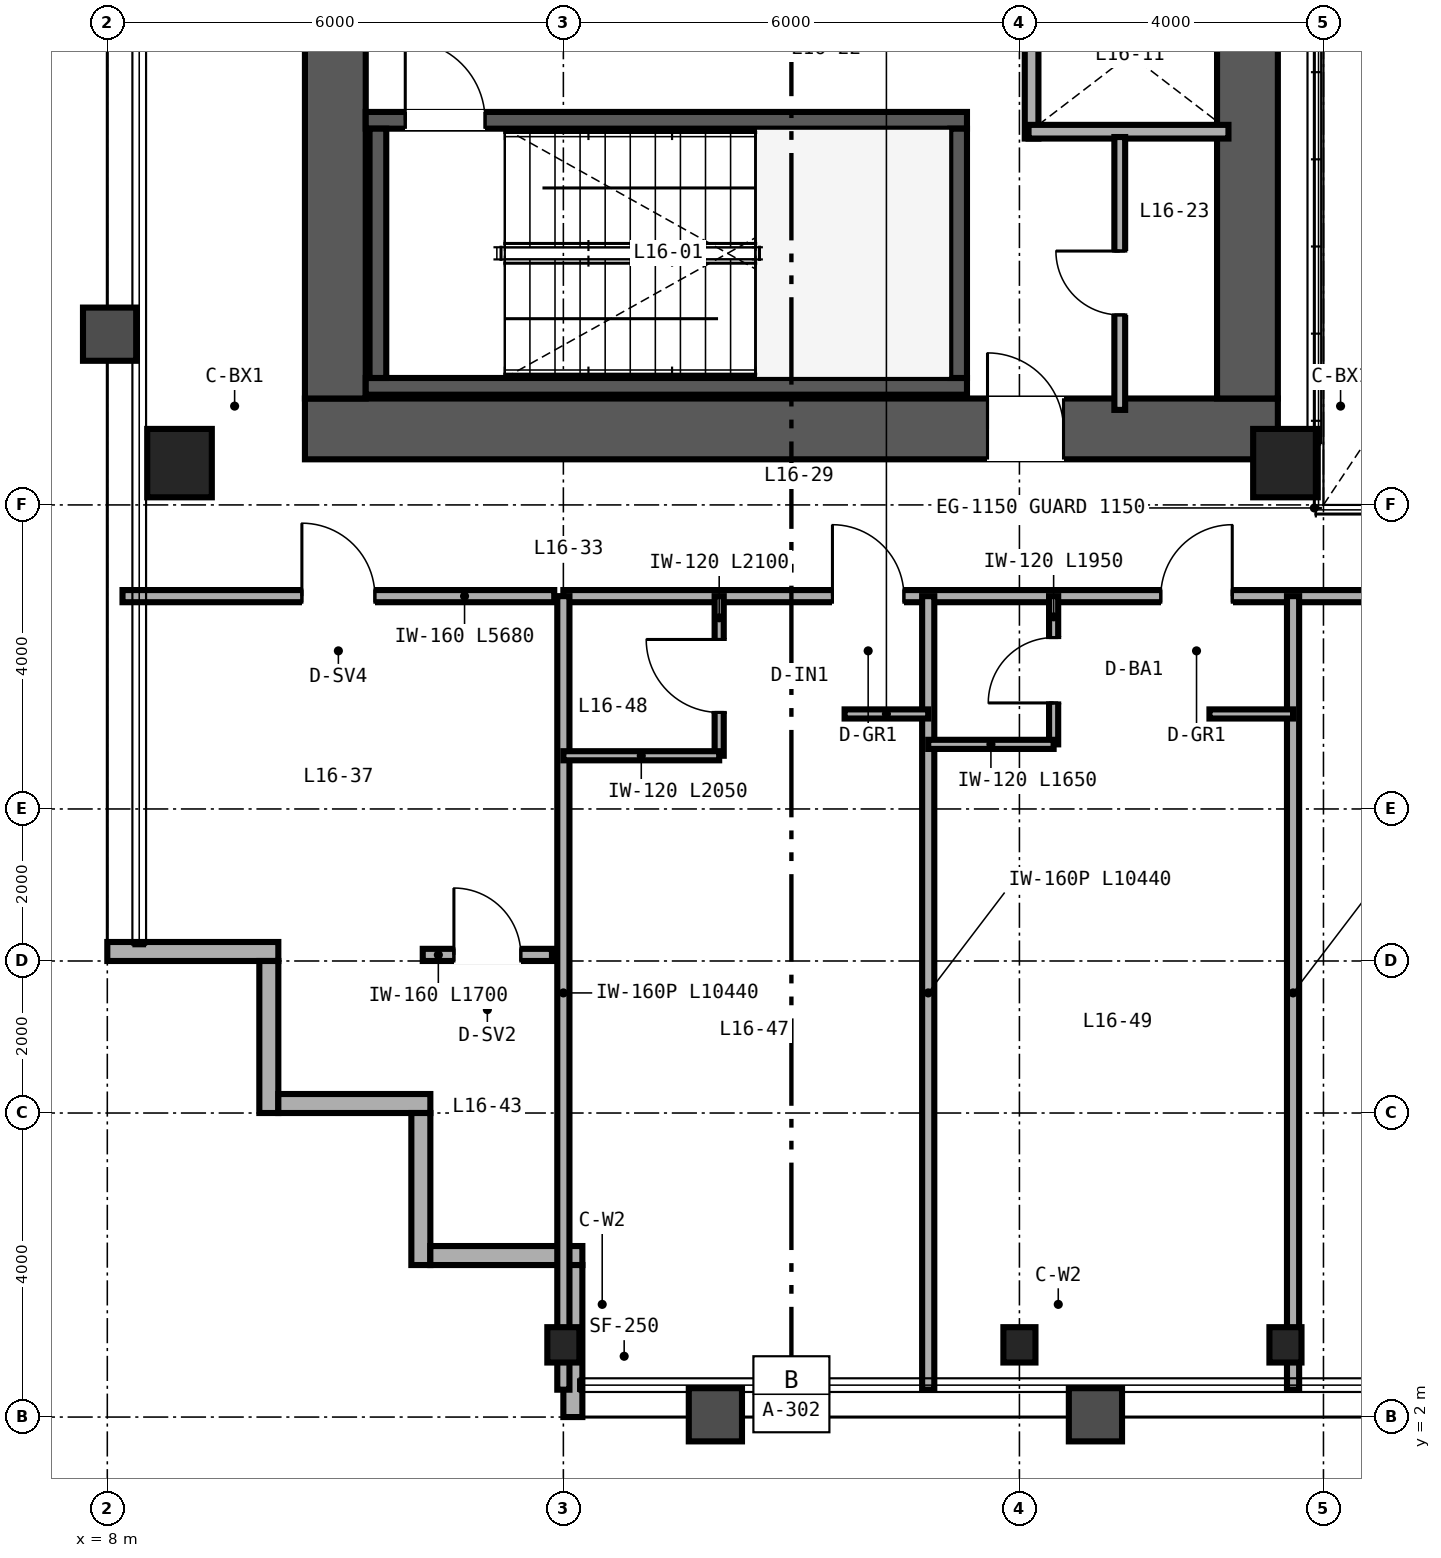
"""IFC4 building model, lengths in metres.
Left out: names, types, materials, properties, quantities, classifications, styles, units other than length and angle.
Written with IfcOpenShell. Run it as: python <this file> out.ifc"""

import sys

from ifc_helpers import new_model, si_unit, direction, frame, frame_2d, origin, origin_2d, place, context, subcontext, project, spatial, rectangle, hollow_rectangle, i_section, extrude, source, transform, mapped, element, fill, save


model = new_model("IFC4")
c1 = context("Model", 3, precision=1e-05, world=origin(), true_north=direction((0.0, 1.0)))
c2 = subcontext(c1, "Body", "Model", "MODEL_VIEW")
j1 = project(units=[si_unit("LENGTHUNIT", "METRE"), si_unit("PLANEANGLEUNIT", "RADIAN")], contexts=[c1])
p1 = place(None, origin())
s1 = spatial("IfcSite", under=j1, at=p1, CompositionType="ELEMENT")
p2 = place(p1, origin())
s2 = spatial("IfcBuilding", under=s1, at=p2, CompositionType="ELEMENT")
p3 = place(p2, frame((0.0, 0.0, 67.2)))
s3 = spatial("IfcBuildingStorey", under=s2, at=p3, CompositionType="ELEMENT", Elevation=67.2)
p4 = place(p3, frame((10.6, 15.0, 0.0), z_axis=(0.0, 0.0, 1.0), x_axis=(1.0, 0.0, 0.0)))
e1 = element("IfcWall", 1, at=p4, inside=s3, PredefinedType="SHEAR", context=c2, shape_type="SweptSolid", body=[
    extrude(rectangle(XDim=12.8, YDim=0.8, at=frame_2d((6.4, 0.0))), origin(), (0.0, 0.0, 1.0), 3.35),
])
p5 = place(p4, frame((8.98, 0.0, 0.0)))
e2 = element("IfcOpeningElement", 2, at=p5, cuts=e1, PredefinedType="OPENING", context=c2, shape_type="SweptSolid", body=[
    extrude(rectangle(XDim=1.0, YDim=2.15, at=frame_2d((0.5, 1.075))), frame((0.0, 0.41, 0.0), z_axis=(0.0, -1.0, 0.0), x_axis=(1.0, 0.0, 0.0)), (0.0, 0.0, 1.0), 0.82),
])
for number, where, z_axis, x_axis in (
    (3, (11.0, 15.4, 0.0), (0.0, 0.0, 1.0), (0.0, 1.0, 0.0)),
    (4, (23.0, 15.4, 0.0), (0.0, 0.0, 1.0), (0.0, 1.0, 0.0)),
):
    element("IfcWall", number, at=place(p3, frame(where, z_axis=z_axis, x_axis=x_axis)), inside=s3, PredefinedType="SHEAR", context=c2, shape_type="SweptSolid", body=[
        extrude(rectangle(XDim=21.2, YDim=0.8, at=frame_2d((10.6, 0.0))), origin(), (0.0, 0.0, 1.0), 3.35),
    ])
p6 = place(p3, frame((11.4, 15.56, 0.0), z_axis=(0.0, 0.0, 1.0), x_axis=(1.0, 0.0, 0.0)))
e5 = element("IfcWall", 5, at=p6, inside=s3, PredefinedType="SHEAR", context=c2, shape_type="SweptSolid", body=[
    extrude(rectangle(XDim=7.91, YDim=0.22, at=frame_2d((3.955, 0.0))), origin(), (0.0, 0.0, 1.0), 3.4),
])
p7 = place(p3, frame((11.4, 19.06, 0.0), z_axis=(0.0, 0.0, 1.0), x_axis=(1.0, 0.0, 0.0)))
e6 = element("IfcWall", 6, at=p7, inside=s3, PredefinedType="SHEAR", context=c2, shape_type="SweptSolid", body=[
    extrude(rectangle(XDim=7.91, YDim=0.22, at=frame_2d((3.955, 0.0))), origin(), (0.0, 0.0, 1.0), 3.4),
])
p8 = place(p7, frame((0.52, 0.0, 0.0)))
e7 = element("IfcOpeningElement", 7, at=p8, cuts=e6, PredefinedType="OPENING", context=c2, shape_type="SweptSolid", body=[
    extrude(rectangle(XDim=1.05, YDim=2.15, at=frame_2d((0.525, 1.075))), frame((0.0, 0.12, 0.0), z_axis=(0.0, -1.0, 0.0), x_axis=(1.0, 0.0, 0.0)), (0.0, 0.0, 1.0), 0.24),
])
for number, where, z_axis, x_axis in (
    (8, (11.56, 15.67, 0.0), (0.0, 0.0, 1.0), (0.0, 1.0, 0.0)),
    (9, (19.2, 15.67, 0.0), (0.0, 0.0, 1.0), (0.0, 1.0, 0.0)),
):
    element("IfcWall", number, at=place(p3, frame(where, z_axis=z_axis, x_axis=x_axis)), inside=s3, PredefinedType="SHEAR", context=c2, shape_type="SweptSolid", body=[
        extrude(rectangle(XDim=3.28, YDim=0.22, at=frame_2d((1.64, 0.0))), origin(), (0.0, 0.0, 1.0), 3.4),
    ])
m1 = source(origin(), c2, "Body", "SweptSolid", [
    extrude(hollow_rectangle(XDim=0.85, YDim=0.9, WallThickness=0.04, at=origin_2d()), origin(), (0.0, 0.0, 1.0), 3.35),
])
for number, where, z_axis, x_axis in (
    (10, (8.95, 14.55, 0.0), (0.0, 0.0, 1.0), (1.0, 0.0, 0.0)),
    (11, (23.5, 14.55, 0.0), (0.0, 0.0, 1.0), (1.0, 0.0, 0.0)),
):
    element("IfcColumn", number, at=place(p3, frame(where, z_axis=z_axis, x_axis=x_axis)), inside=s3, PredefinedType="COLUMN", context=c2, shape_type="MappedRepresentation", body=[
        mapped(m1, transform((0.0, 0.0, 0.0), scale=1.0)),
    ])
m2 = source(origin(), c2, "Body", "SweptSolid", [
    extrude(i_section(OverallWidth=0.422, OverallDepth=0.465, WebThickness=0.045, FlangeThickness=0.073, FilletRadius=0.025, at=origin_2d()), origin(), (0.0, 0.0, 1.0), 3.35),
])
for number, where, z_axis, x_axis in (
    (12, (14.0, 2.95, 0.0), (0.0, 0.0, 1.0), (1.0, 0.0, 0.0)),
    (13, (20.0, 2.95, 0.0), (0.0, 0.0, 1.0), (1.0, 0.0, 0.0)),
    (14, (23.5, 2.95, 0.0), (0.0, 0.0, 1.0), (1.0, 0.0, 0.0)),
):
    element("IfcColumn", number, at=place(p3, frame(where, z_axis=z_axis, x_axis=x_axis)), inside=s3, PredefinedType="COLUMN", context=c2, shape_type="MappedRepresentation", body=[
        mapped(m2, transform((0.0, 0.0, 0.0), scale=1.0)),
    ])
p9 = place(p3, frame((8.0, 8.125, 0.0), z_axis=(0.0, 0.0, 1.0), x_axis=(1.0, 0.0, 0.0)))
e15 = element("IfcWall", 15, at=p9, inside=s3, PredefinedType="SOLIDWALL", context=c2, shape_type="SweptSolid", body=[
    extrude(rectangle(XDim=2.25, YDim=0.25, at=frame_2d((1.125, 0.0))), origin(), (0.0, 0.0, 1.0), 3.35),
])
for number, where, z_axis, x_axis in (
    (16, (10.125, 8.0, 0.0), (0.0, 0.0, 1.0), (0.0, -1.0, 0.0)),
    (17, (10.25, 6.125, 0.0), (0.0, 0.0, 1.0), (1.0, 0.0, 0.0)),
    (18, (12.125, 6.0, 0.0), (0.0, 0.0, 1.0), (0.0, -1.0, 0.0)),
    (19, (12.25, 4.125, 0.0), (0.0, 0.0, 1.0), (1.0, 0.0, 0.0)),
):
    element("IfcWall", number, at=place(p3, frame(where, z_axis=z_axis, x_axis=x_axis)), inside=s3, PredefinedType="SOLIDWALL", context=c2, shape_type="SweptSolid", body=[
        extrude(rectangle(XDim=2.0, YDim=0.25, at=frame_2d((1.0, 0.0))), origin(), (0.0, 0.0, 1.0), 3.35),
    ])
p10 = place(p3, frame((14.125, 4.0, 0.0), z_axis=(0.0, 0.0, 1.0), x_axis=(0.0, -1.0, 0.0)))
e20 = element("IfcWall", 20, at=p10, inside=s3, PredefinedType="SOLIDWALL", context=c2, shape_type="SweptSolid", body=[
    extrude(rectangle(XDim=2.0, YDim=0.25, at=frame_2d((1.0, 0.0))), origin(), (0.0, 0.0, 1.0), 2.657),
])
p11 = place(p3, frame((20.16, 18.82, 0.0), z_axis=(0.0, 0.0, 1.0), x_axis=(0.0, 1.0, 0.0)))
e21 = element("IfcWall", 21, at=p11, inside=s3, PredefinedType="SOLIDWALL", context=c2, shape_type="SweptSolid", body=[
    extrude(rectangle(XDim=6.32, YDim=0.18, at=frame_2d((3.16, 0.0))), origin(), (0.0, 0.0, 1.0), 2.36),
])
p12 = place(p3, frame((20.12, 18.91, 0.0), z_axis=(0.0, 0.0, 1.0), x_axis=(1.0, 0.0, 0.0)))
e22 = element("IfcWall", 22, at=p12, inside=s3, PredefinedType="SOLIDWALL", context=c2, shape_type="SweptSolid", body=[
    extrude(rectangle(XDim=2.63, YDim=0.18, at=frame_2d((1.315, 0.0))), origin(), (0.0, 0.0, 1.0), 3.35),
])
p13 = place(p3, frame((21.32, 15.25, 0.0), z_axis=(0.0, 0.0, 1.0), x_axis=(0.0, 1.0, 0.0)))
e23 = element("IfcWall", 23, at=p13, inside=s3, PredefinedType="PARTITIONING", context=c2, shape_type="SweptSolid", body=[
    extrude(rectangle(XDim=3.59, YDim=0.142, at=frame_2d((1.795, 0.0))), origin(), (0.0, 0.0, 1.0), 3.35),
])
p14 = place(p13, frame((1.25, 0.0, 0.0)))
e24 = element("IfcOpeningElement", 24, at=p14, cuts=e23, PredefinedType="OPENING", context=c2, shape_type="SweptSolid", body=[
    extrude(rectangle(XDim=0.84, YDim=2.1, at=frame_2d((0.42, 1.05))), frame((0.0, 0.081, 0.0), z_axis=(0.0, -1.0, 0.0), x_axis=(1.0, 0.0, 0.0)), (0.0, 0.0, 1.0), 0.162),
])
p15 = place(p3, frame((8.2, 12.8, 0.0), z_axis=(0.0, 0.0, 1.0), x_axis=(1.0, 0.0, 0.0)))
e25 = element("IfcWall", 25, at=p15, inside=s3, PredefinedType="PARTITIONING", context=c2, shape_type="SweptSolid", body=[
    extrude(rectangle(XDim=5.68, YDim=0.16, at=frame_2d((2.84, 0.0))), origin(), (0.0, 0.0, 1.0), 3.35),
])
p16 = place(p15, frame((2.36, 0.0, 0.0)))
e26 = element("IfcOpeningElement", 26, at=p16, cuts=e25, PredefinedType="OPENING", context=c2, shape_type="SweptSolid", body=[
    extrude(rectangle(XDim=0.96, YDim=2.15, at=frame_2d((0.48, 1.075))), frame((0.0, 0.09, 0.0), z_axis=(0.0, -1.0, 0.0), x_axis=(1.0, 0.0, 0.0)), (0.0, 0.0, 1.0), 0.18),
])
p17 = place(p3, frame((12.15, 8.08, 0.0), z_axis=(0.0, 0.0, 1.0), x_axis=(1.0, 0.0, 0.0)))
e27 = element("IfcWall", 27, at=p17, inside=s3, PredefinedType="PARTITIONING", context=c2, shape_type="SweptSolid", body=[
    extrude(rectangle(XDim=1.7, YDim=0.16, at=frame_2d((0.85, 0.0))), origin(), (0.0, 0.0, 1.0), 3.35),
])
p18 = place(p17, frame((0.41, 0.0, 0.0)))
e28 = element("IfcOpeningElement", 28, at=p18, cuts=e27, PredefinedType="OPENING", context=c2, shape_type="SweptSolid", body=[
    extrude(rectangle(XDim=0.88, YDim=2.15, at=frame_2d((0.44, 1.075))), frame((0.0, 0.09, 0.0), z_axis=(0.0, -1.0, 0.0), x_axis=(1.0, 0.0, 0.0)), (0.0, 0.0, 1.0), 0.18),
])
p19 = place(p3, frame((14.0, 12.8, 0.0), z_axis=(0.0, 0.0, 1.0), x_axis=(1.0, 0.0, 0.0)))
e29 = element("IfcWall", 29, at=p19, inside=s3, PredefinedType="PARTITIONING", context=c2, shape_type="SweptSolid", body=[
    extrude(rectangle(XDim=36.0, YDim=0.16, at=frame_2d((18.0, 0.0))), origin(), (0.0, 0.0, 1.0), 2.571),
])
p20 = place(p19, frame((3.54, 0.0, 0.0)))
e30 = element("IfcOpeningElement", 30, at=p20, cuts=e29, PredefinedType="OPENING", context=c2, shape_type="SweptSolid", body=[
    extrude(rectangle(XDim=0.94, YDim=2.15, at=frame_2d((0.47, 1.075))), frame((0.0, 0.09, 0.0), z_axis=(0.0, -1.0, 0.0), x_axis=(1.0, 0.0, 0.0)), (0.0, 0.0, 1.0), 0.18),
])
p21 = place(p19, frame((7.86, 0.0, 0.0)))
e31 = element("IfcOpeningElement", 31, at=p21, cuts=e29, PredefinedType="OPENING", context=c2, shape_type="SweptSolid", body=[
    extrude(rectangle(XDim=0.94, YDim=2.15, at=frame_2d((0.47, 1.075))), frame((0.0, 0.09, 0.0), z_axis=(0.0, -1.0, 0.0), x_axis=(1.0, 0.0, 0.0)), (0.0, 0.0, 1.0), 0.18),
])
p22 = place(p19, frame((11.92, 0.0, 0.0)))
e32 = element("IfcOpeningElement", 32, at=p22, cuts=e29, PredefinedType="OPENING", context=c2, shape_type="SweptSolid", body=[
    extrude(rectangle(XDim=0.96, YDim=2.15, at=frame_2d((0.48, 1.075))), frame((0.0, 0.09, 0.0), z_axis=(0.0, -1.0, 0.0), x_axis=(1.0, 0.0, 0.0)), (0.0, 0.0, 1.0), 0.18),
])
p23 = place(p19, frame((17.52, 0.0, 0.0)))
e33 = element("IfcOpeningElement", 33, at=p23, cuts=e29, PredefinedType="OPENING", context=c2, shape_type="SweptSolid", body=[
    extrude(rectangle(XDim=0.96, YDim=2.15, at=frame_2d((0.48, 1.075))), frame((0.0, 0.09, 0.0), z_axis=(0.0, -1.0, 0.0), x_axis=(1.0, 0.0, 0.0)), (0.0, 0.0, 1.0), 0.18),
])
p24 = place(p19, frame((24.74, 0.0, 0.0)))
e34 = element("IfcOpeningElement", 34, at=p24, cuts=e29, PredefinedType="OPENING", context=c2, shape_type="SweptSolid", body=[
    extrude(rectangle(XDim=0.94, YDim=2.15, at=frame_2d((0.47, 1.075))), frame((0.0, 0.09, 0.0), z_axis=(0.0, -1.0, 0.0), x_axis=(1.0, 0.0, 0.0)), (0.0, 0.0, 1.0), 0.18),
])
p25 = place(p19, frame((29.74, 0.0, 0.0)))
e35 = element("IfcOpeningElement", 35, at=p25, cuts=e29, PredefinedType="OPENING", context=c2, shape_type="SweptSolid", body=[
    extrude(rectangle(XDim=0.94, YDim=2.15, at=frame_2d((0.47, 1.075))), frame((0.0, 0.09, 0.0), z_axis=(0.0, -1.0, 0.0), x_axis=(1.0, 0.0, 0.0)), (0.0, 0.0, 1.0), 0.18),
])
p26 = place(p19, frame((33.02, 0.0, 0.0)))
e36 = element("IfcOpeningElement", 36, at=p26, cuts=e29, PredefinedType="OPENING", context=c2, shape_type="SweptSolid", body=[
    extrude(rectangle(XDim=0.96, YDim=2.15, at=frame_2d((0.48, 1.075))), frame((0.0, 0.09, 0.0), z_axis=(0.0, -1.0, 0.0), x_axis=(1.0, 0.0, 0.0)), (0.0, 0.0, 1.0), 0.18),
])
for number, where, z_axis, x_axis in (
    (37, (14.0, 2.36, 0.0), (0.0, 0.0, 1.0), (0.0, 1.0, 0.0)),
    (38, (18.8, 2.36, 0.0), (0.0, 0.0, 1.0), (0.0, 1.0, 0.0)),
):
    element("IfcWall", number, at=place(p3, frame(where, z_axis=z_axis, x_axis=x_axis)), inside=s3, PredefinedType="PARTITIONING", context=c2, shape_type="SweptSolid", body=[
        extrude(rectangle(XDim=10.44, YDim=0.16, at=frame_2d((5.22, 0.0))), origin(), (0.0, 0.0, 1.0), 2.657),
    ])
p27 = place(p3, frame((16.05, 10.7, 0.0), z_axis=(0.0, 0.0, 1.0), x_axis=(0.0, 1.0, 0.0)))
e39 = element("IfcWall", 39, at=p27, inside=s3, PredefinedType="PARTITIONING", context=c2, shape_type="SweptSolid", body=[
    extrude(rectangle(XDim=2.1, YDim=0.12, at=frame_2d((1.05, 0.0))), origin(), (0.0, 0.0, 1.0), 3.35),
])
p28 = place(p27, frame((0.57, 0.0, 0.0)))
e40 = element("IfcOpeningElement", 40, at=p28, cuts=e39, PredefinedType="OPENING", context=c2, shape_type="SweptSolid", body=[
    extrude(rectangle(XDim=0.96, YDim=2.15, at=frame_2d((0.48, 1.075))), frame((0.0, 0.07, 0.0), z_axis=(0.0, -1.0, 0.0), x_axis=(1.0, 0.0, 0.0)), (0.0, 0.0, 1.0), 0.14),
])
p29 = place(p3, frame((14.0, 10.7, 0.0), z_axis=(0.0, 0.0, 1.0), x_axis=(1.0, 0.0, 0.0)))
e41 = element("IfcWall", 41, at=p29, inside=s3, PredefinedType="PARTITIONING", context=c2, shape_type="SweptSolid", body=[
    extrude(rectangle(XDim=2.05, YDim=0.12, at=frame_2d((1.025, 0.0))), origin(), (0.0, 0.0, 1.0), 3.35),
])
p30 = place(p3, frame((17.7, 11.25, 0.0), z_axis=(0.0, 0.0, 1.0), x_axis=(1.0, 0.0, 0.0)))
e42 = element("IfcWall", 42, at=p30, inside=s3, PredefinedType="PARTITIONING", context=c2, shape_type="SweptSolid", body=[
    extrude(rectangle(XDim=1.1, YDim=0.12, at=frame_2d((0.55, 0.0))), origin(), (0.0, 0.0, 1.0), 3.35),
])
p31 = place(p3, frame((23.6, 2.36, 0.0), z_axis=(0.0, 0.0, 1.0), x_axis=(0.0, 1.0, 0.0)))
e43 = element("IfcWall", 43, at=p31, inside=s3, PredefinedType="PARTITIONING", context=c2, shape_type="SweptSolid", body=[
    extrude(rectangle(XDim=10.44, YDim=0.16, at=frame_2d((5.22, 0.0))), origin(), (0.0, 0.0, 1.0), 2.423),
])
p32 = place(p3, frame((20.45, 10.85, 0.0), z_axis=(0.0, 0.0, 1.0), x_axis=(0.0, 1.0, 0.0)))
e44 = element("IfcWall", 44, at=p32, inside=s3, PredefinedType="PARTITIONING", context=c2, shape_type="SweptSolid", body=[
    extrude(rectangle(XDim=1.95, YDim=0.12, at=frame_2d((0.975, 0.0))), origin(), (0.0, 0.0, 1.0), 3.35),
])
p33 = place(p32, frame((0.545, 0.0, 0.0)))
e45 = element("IfcOpeningElement", 45, at=p33, cuts=e44, PredefinedType="OPENING", context=c2, shape_type="SweptSolid", body=[
    extrude(rectangle(XDim=0.86, YDim=2.1, at=frame_2d((0.43, 1.05))), frame((0.0, 0.07, 0.0), z_axis=(0.0, -1.0, 0.0), x_axis=(1.0, 0.0, 0.0)), (0.0, 0.0, 1.0), 0.14),
])
p34 = place(p3, frame((18.8, 10.85, 0.0), z_axis=(0.0, 0.0, 1.0), x_axis=(1.0, 0.0, 0.0)))
e46 = element("IfcWall", 46, at=p34, inside=s3, PredefinedType="PARTITIONING", context=c2, shape_type="SweptSolid", body=[
    extrude(rectangle(XDim=1.65, YDim=0.12, at=frame_2d((0.825, 0.0))), origin(), (0.0, 0.0, 1.0), 3.35),
])
p35 = place(p3, frame((22.5, 11.25, 0.0), z_axis=(0.0, 0.0, 1.0), x_axis=(1.0, 0.0, 0.0)))
e47 = element("IfcWall", 47, at=p35, inside=s3, PredefinedType="PARTITIONING", context=c2, shape_type="SweptSolid", body=[
    extrude(rectangle(XDim=1.1, YDim=0.12, at=frame_2d((0.55, 0.0))), origin(), (0.0, 0.0, 1.0), 2.571),
])
m3 = source(origin(), c2, "Body", "SweptSolid", [
    extrude(rectangle(XDim=1.05, YDim=2.15, at=frame_2d((0.525, 1.075))), frame((0.0, 0.025, 0.0), z_axis=(0.0, -1.0, 0.0), x_axis=(1.0, 0.0, 0.0)), (0.0, 0.0, 1.0), 0.05),
])
p36 = place(p8, origin())
e48 = element("IfcDoor", 48, at=p36, inside=s3, OperationType="SINGLE_SWING_LEFT", PredefinedType="DOOR", context=c2, shape_type="MappedRepresentation", body=[
    mapped(m3, transform((0.0, 0.0, 0.0), scale=1.0)),
])
fill(e7, e48)
m4 = source(origin(), c2, "Body", "SweptSolid", [
    extrude(rectangle(XDim=0.84, YDim=2.1, at=frame_2d((0.42, 1.05))), frame((0.0, 0.025, 0.0), z_axis=(0.0, -1.0, 0.0), x_axis=(1.0, 0.0, 0.0)), (0.0, 0.0, 1.0), 0.05),
])
p37 = place(p14, origin())
e49 = element("IfcDoor", 49, at=p37, inside=s3, OperationType="SINGLE_SWING_RIGHT", PredefinedType="DOOR", context=c2, shape_type="MappedRepresentation", body=[
    mapped(m4, transform((0.0, 0.0, 0.0), scale=1.0)),
])
fill(e24, e49)
m5 = source(origin(), c2, "Body", "SweptSolid", [
    extrude(rectangle(XDim=1.0, YDim=2.15, at=frame_2d((0.5, 1.075))), frame((0.0, 0.025, 0.0), z_axis=(0.0, -1.0, 0.0), x_axis=(1.0, 0.0, 0.0)), (0.0, 0.0, 1.0), 0.05),
])
p38 = place(p5, origin())
e50 = element("IfcDoor", 50, at=p38, inside=s3, OperationType="SINGLE_SWING_LEFT", PredefinedType="DOOR", context=c2, shape_type="MappedRepresentation", body=[
    mapped(m5, transform((0.0, 0.0, 0.0), scale=1.0)),
])
fill(e2, e50)
m6 = source(origin(), c2, "Body", "SweptSolid", [
    extrude(rectangle(XDim=0.96, YDim=2.15, at=frame_2d((0.48, 1.075))), frame((0.0, 0.025, 0.0), z_axis=(0.0, -1.0, 0.0), x_axis=(1.0, 0.0, 0.0)), (0.0, 0.0, 1.0), 0.05),
])
p39 = place(p16, origin())
e51 = element("IfcDoor", 51, at=p39, inside=s3, OperationType="SINGLE_SWING_LEFT", PredefinedType="DOOR", context=c2, shape_type="MappedRepresentation", body=[
    mapped(m6, transform((0.0, 0.0, 0.0), scale=1.0)),
])
fill(e26, e51)
m7 = source(origin(), c2, "Body", "SweptSolid", [
    extrude(rectangle(XDim=0.88, YDim=2.15, at=frame_2d((0.44, 1.075))), frame((0.0, 0.025, 0.0), z_axis=(0.0, -1.0, 0.0), x_axis=(1.0, 0.0, 0.0)), (0.0, 0.0, 1.0), 0.05),
])
p40 = place(p18, origin())
e52 = element("IfcDoor", 52, at=p40, inside=s3, OperationType="SINGLE_SWING_LEFT", PredefinedType="DOOR", context=c2, shape_type="MappedRepresentation", body=[
    mapped(m7, transform((0.0, 0.0, 0.0), scale=1.0)),
])
fill(e28, e52)
p41 = place(p28, origin())
e53 = element("IfcDoor", 53, at=p41, inside=s3, OperationType="SINGLE_SWING_RIGHT", PredefinedType="DOOR", context=c2, shape_type="MappedRepresentation", body=[
    mapped(m6, transform((0.0, 0.0, 0.0), scale=1.0)),
])
fill(e40, e53)
m8 = source(origin(), c2, "Body", "SweptSolid", [
    extrude(rectangle(XDim=0.86, YDim=2.1, at=frame_2d((0.43, 1.05))), frame((0.0, 0.025, 0.0), z_axis=(0.0, -1.0, 0.0), x_axis=(1.0, 0.0, 0.0)), (0.0, 0.0, 1.0), 0.05),
])
p42 = place(p33, origin())
e54 = element("IfcDoor", 54, at=p42, inside=s3, OperationType="SINGLE_SWING_LEFT", PredefinedType="DOOR", context=c2, shape_type="MappedRepresentation", body=[
    mapped(m8, transform((0.0, 0.0, 0.0), scale=1.0)),
])
fill(e45, e54)
m9 = source(origin(), c2, "Body", "SweptSolid", [
    extrude(rectangle(XDim=0.94, YDim=2.15, at=frame_2d((0.47, 1.075))), frame((0.0, 0.025, 0.0), z_axis=(0.0, -1.0, 0.0), x_axis=(1.0, 0.0, 0.0)), (0.0, 0.0, 1.0), 0.05),
])
p43 = place(p20, origin())
e55 = element("IfcDoor", 55, at=p43, inside=s3, OperationType="SINGLE_SWING_LEFT", PredefinedType="DOOR", context=c2, shape_type="MappedRepresentation", body=[
    mapped(m9, transform((0.0, 0.0, 0.0), scale=1.0)),
])
fill(e30, e55)
p44 = place(p21, origin())
e56 = element("IfcDoor", 56, at=p44, inside=s3, OperationType="SINGLE_SWING_RIGHT", PredefinedType="DOOR", context=c2, shape_type="MappedRepresentation", body=[
    mapped(m9, transform((0.0, 0.0, 0.0), scale=1.0)),
])
fill(e31, e56)
save(model, sys.argv[1])
